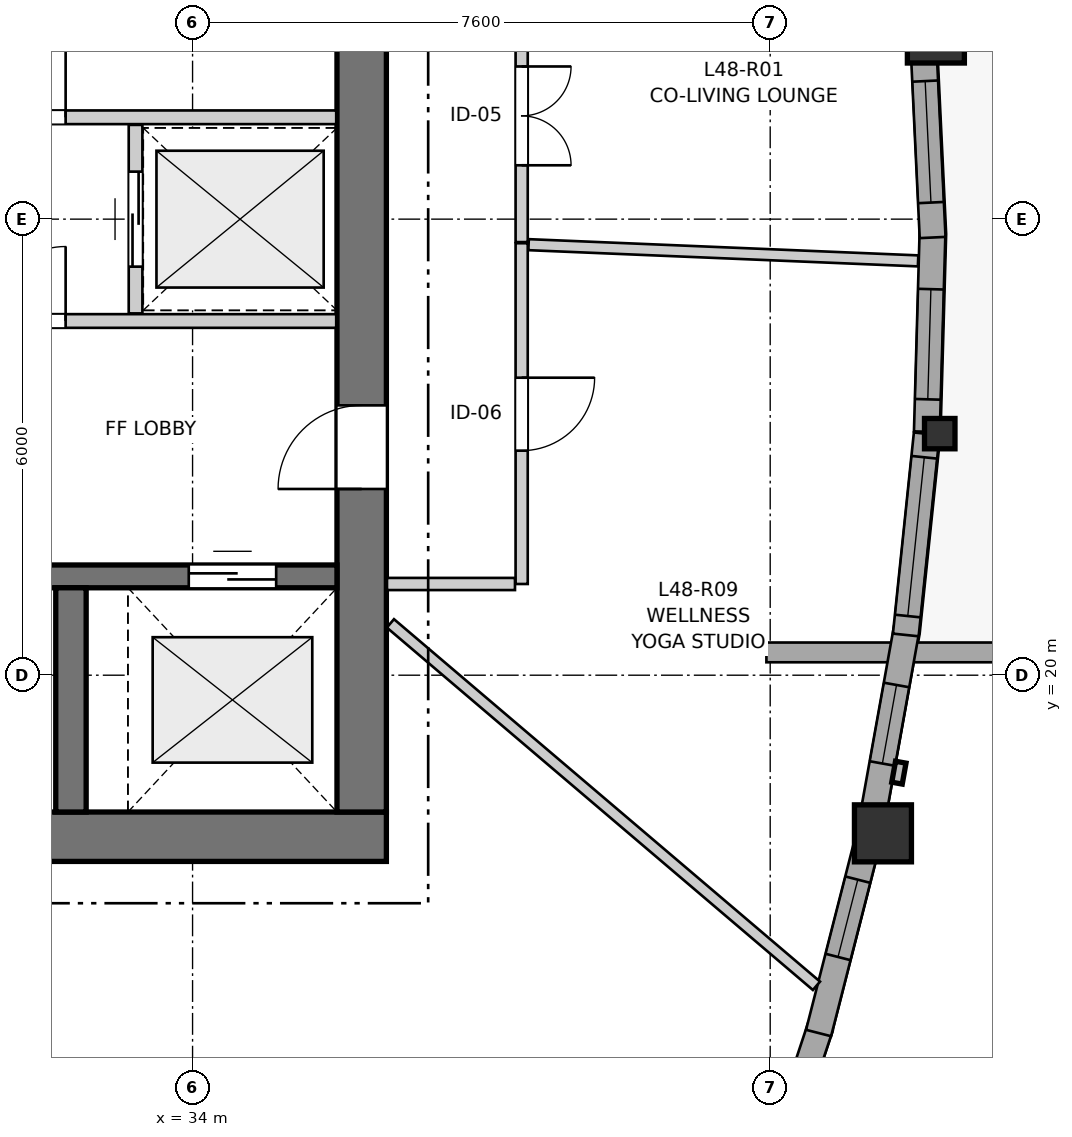
"""IFC4 building model, lengths in metres.
Left out: names, types, materials, properties, quantities, classifications, styles, units other than length and angle.
Written with IfcOpenShell. Run it as: python <this file> out.ifc"""

import sys

from ifc_helpers import new_model, si_unit, direction, frame, frame_2d, origin, origin_2d, place, context, subcontext, project, spatial, rectangle, i_section, extrude, source, transform, mapped, element, fill, save


model = new_model("IFC4")
c1 = context("Model", 3, precision=1e-05, world=origin(), true_north=direction((0.0, 1.0)))
c2 = subcontext(c1, "Body", "Model", "MODEL_VIEW")
j1 = project(units=[si_unit("LENGTHUNIT", "METRE"), si_unit("PLANEANGLEUNIT", "RADIAN")], contexts=[c1])
p1 = place(None, origin())
s1 = spatial("IfcSite", under=j1, at=p1, CompositionType="ELEMENT")
p2 = place(p1, origin())
s2 = spatial("IfcBuilding", under=s1, at=p2, CompositionType="ELEMENT")
p3 = place(p2, frame((0.0, 0.0, 161.8)))
s3 = spatial("IfcBuildingStorey", under=s2, at=p3, CompositionType="ELEMENT", Elevation=161.8)
p4 = place(p3, frame((24.15, 17.875, 0.0), z_axis=(0.0, 0.0, 1.0), x_axis=(1.0, 0.0, 0.0)))
e1 = element("IfcWall", 1, at=p4, inside=s3, PredefinedType="SHEAR", context=c2, shape_type="SweptSolid", body=[
    extrude(rectangle(XDim=12.4, YDim=0.65, at=frame_2d((6.2, 0.0))), origin(), (0.0, 0.0, 1.0), 2.95),
])
p5 = place(p3, frame((36.225, 18.2, 0.0), z_axis=(0.0, 0.0, 1.0), x_axis=(0.0, 1.0, 0.0)))
e2 = element("IfcWall", 2, at=p5, inside=s3, PredefinedType="SHEAR", context=c2, shape_type="SweptSolid", body=[
    extrude(rectangle(XDim=15.6, YDim=0.65, at=frame_2d((7.8, 0.0))), origin(), (0.0, 0.0, 1.0), 2.95),
])
p6 = place(p5, frame((4.25, 0.0, 0.0)))
e3 = element("IfcOpeningElement", 3, at=p6, cuts=e2, PredefinedType="OPENING", context=c2, shape_type="SweptSolid", body=[
    extrude(rectangle(XDim=1.1, YDim=2.15, at=frame_2d((0.55, 1.075))), frame((0.0, 0.335, 0.0), z_axis=(0.0, -1.0, 0.0), x_axis=(1.0, 0.0, 0.0)), (0.0, 0.0, 1.0), 0.67),
])
p7 = place(p5, frame((10.25, 0.0, 0.0)))
e4 = element("IfcOpeningElement", 4, at=p7, cuts=e2, PredefinedType="OPENING", context=c2, shape_type="SweptSolid", body=[
    extrude(rectangle(XDim=1.1, YDim=2.15, at=frame_2d((0.55, 1.075))), frame((0.0, 0.335, 0.0), z_axis=(0.0, -1.0, 0.0), x_axis=(1.0, 0.0, 0.0)), (0.0, 0.0, 1.0), 0.67),
])
p8 = place(p3, frame((24.8, 21.3, 0.0), z_axis=(0.0, 0.0, 1.0), x_axis=(1.0, 0.0, 0.0)))
e5 = element("IfcWall", 5, at=p8, inside=s3, PredefinedType="SHEAR", context=c2, shape_type="SweptSolid", body=[
    extrude(rectangle(XDim=11.1, YDim=0.3, at=frame_2d((5.55, 0.0))), origin(), (0.0, 0.0, 1.0), 2.95),
])
p9 = place(p8, frame((6.22, 0.0, 0.0)))
e6 = element("IfcOpeningElement", 6, at=p9, cuts=e5, PredefinedType="OPENING", context=c2, shape_type="SweptSolid", body=[
    extrude(rectangle(XDim=0.98, YDim=2.15, at=frame_2d((0.49, 1.075))), frame((0.0, 0.16, 0.0), z_axis=(0.0, -1.0, 0.0), x_axis=(1.0, 0.0, 0.0)), (0.0, 0.0, 1.0), 0.32),
])
p10 = place(p8, frame((9.15, 0.0, 0.0)))
e7 = element("IfcOpeningElement", 7, at=p10, cuts=e5, PredefinedType="OPENING", context=c2, shape_type="SweptSolid", body=[
    extrude(rectangle(XDim=1.15, YDim=2.15, at=frame_2d((0.575, 1.075))), frame((0.0, 0.16, 0.0), z_axis=(0.0, -1.0, 0.0), x_axis=(1.0, 0.0, 0.0)), (0.0, 0.0, 1.0), 0.32),
])
p11 = place(p3, frame((32.4, 18.2, 0.0), z_axis=(0.0, 0.0, 1.0), x_axis=(0.0, 1.0, 0.0)))
e8 = element("IfcWall", 8, at=p11, inside=s3, PredefinedType="SHEAR", context=c2, shape_type="SweptSolid", body=[
    extrude(rectangle(XDim=2.95, YDim=0.4, at=frame_2d((1.475, 0.0))), origin(), (0.0, 0.0, 1.0), 2.95),
])
m1 = source(origin(), c2, "Body", "SweptSolid", [
    extrude(rectangle(XDim=0.75, YDim=0.75, at=origin_2d()), origin(), (0.0, 0.0, 1.0), 2.95),
])
p12 = place(p3, frame((43.083, 17.919, 0.0), z_axis=(0.0, 0.0, 1.0), x_axis=(1.0, 0.0, 0.0)))
e9 = element("IfcColumn", 9, at=p12, inside=s3, PredefinedType="COLUMN", context=c2, shape_type="MappedRepresentation", body=[
    mapped(m1, transform((0.0, 0.0, 0.0), x_axis=(1.0, 0.0, 0.0), y_axis=(0.0, 1.0, 0.0), z_axis=(0.0, 0.0, 1.0), scale=1.0)),
])
m2 = source(origin(), c2, "Body", "SweptSolid", [
    extrude(i_section(OverallWidth=0.401, OverallDepth=0.399, WebThickness=0.023, FlangeThickness=0.036, FilletRadius=0.015, at=origin_2d()), origin(), (0.0, 0.0, 1.0), 2.95),
])
p13 = place(p3, frame((43.831, 23.178, 0.0), z_axis=(0.0, 0.0, 1.0), x_axis=(1.0, 0.0, 0.0)))
e10 = element("IfcColumn", 10, at=p13, inside=s3, PredefinedType="PILASTER", context=c2, shape_type="MappedRepresentation", body=[
    mapped(m2, transform((0.0, 0.0, 0.0), x_axis=(1.0, 0.0, 0.0), y_axis=(0.0, 1.0, 0.0), z_axis=(0.0, 0.0, 1.0), scale=1.0)),
])
p14 = place(p3, frame((43.78, 28.429, 0.0), z_axis=(0.0, 0.0, 1.0), x_axis=(1.0, 0.0, 0.0)))
e11 = element("IfcColumn", 11, at=p14, inside=s3, PredefinedType="COLUMN", context=c2, shape_type="MappedRepresentation", body=[
    mapped(m1, transform((0.0, 0.0, 0.0), x_axis=(1.0, 0.0, 0.0), y_axis=(0.0, 1.0, 0.0), z_axis=(0.0, 0.0, 1.0), scale=1.0)),
])
p15 = place(p3, frame((41.55, 20.3, 0.0), z_axis=(0.0, 0.0, 1.0), x_axis=(1.0, 0.0, 0.0)))
e12 = element("IfcWall", 12, at=p15, inside=s3, PredefinedType="PARAPET", context=c2, shape_type="SweptSolid", body=[
    extrude(rectangle(XDim=17.843, YDim=0.26, at=frame_2d((8.921, 0.0))), origin(), (0.0, 0.0, 1.0), 0.55),
])
p16 = place(p3, frame((41.383, 12.726, 0.0), z_axis=(0.0, 0.0, 1.0), x_axis=(0.314443872574, 0.949276066801, 0.0)))
e13 = element("IfcWall", 13, at=p16, inside=s3, PredefinedType="SOLIDWALL", context=c2, shape_type="SweptSolid", body=[
    extrude(rectangle(XDim=2.793, YDim=0.34, at=frame_2d((1.396, 0.0))), origin(), (0.0, 0.0, 1.0), 2.53),
])
p17 = place(p16, frame((0.711, 0.0, 0.82)))
e14 = element("IfcOpeningElement", 14, at=p17, cuts=e13, PredefinedType="OPENING", context=c2, shape_type="SweptSolid", body=[
    extrude(rectangle(XDim=1.35, YDim=1.45, at=frame_2d((0.675, 0.725))), frame((0.0, 0.18, 0.0), z_axis=(0.0, -1.0, 0.0), x_axis=(1.0, 0.0, 0.0)), (0.0, 0.0, 1.0), 0.36),
])
p18 = place(p3, frame((42.236, 15.292, 0.0), z_axis=(0.0, 0.0, 1.0), x_axis=(0.24772461275, 0.968830488908, 0.0)))
e15 = element("IfcWall", 15, at=p18, inside=s3, PredefinedType="SOLIDWALL", context=c2, shape_type="SweptSolid", body=[
    extrude(rectangle(XDim=2.6, YDim=0.34, at=frame_2d((1.3, 0.0))), origin(), (0.0, 0.0, 1.0), 2.53),
])
p19 = place(p18, frame((1.033, 0.0, 0.82)))
e16 = element("IfcOpeningElement", 16, at=p19, cuts=e15, PredefinedType="OPENING", context=c2, shape_type="SweptSolid", body=[
    extrude(rectangle(XDim=1.05, YDim=1.45, at=frame_2d((0.525, 0.725))), frame((0.0, 0.18, 0.0), z_axis=(0.0, -1.0, 0.0), x_axis=(1.0, 0.0, 0.0)), (0.0, 0.0, 1.0), 0.36),
])
p20 = place(p3, frame((42.944, 18.102, 0.0), z_axis=(0.0, 0.0, 1.0), x_axis=(0.177119685378, 0.98418931972, 0.0)))
e17 = element("IfcWall", 17, at=p20, inside=s3, PredefinedType="SOLIDWALL", context=c2, shape_type="SweptSolid", body=[
    extrude(rectangle(XDim=2.555, YDim=0.34, at=frame_2d((1.278, 0.0))), origin(), (0.0, 0.0, 1.0), 2.53),
])
p21 = place(p20, frame((0.748, 0.0, 0.82)))
e18 = element("IfcOpeningElement", 18, at=p21, cuts=e17, PredefinedType="OPENING", context=c2, shape_type="SweptSolid", body=[
    extrude(rectangle(XDim=1.05, YDim=1.45, at=frame_2d((0.525, 0.725))), frame((0.0, 0.18, 0.0), z_axis=(0.0, -1.0, 0.0), x_axis=(1.0, 0.0, 0.0)), (0.0, 0.0, 1.0), 0.36),
])
p22 = place(p3, frame((43.384, 20.53, 0.0), z_axis=(0.0, 0.0, 1.0), x_axis=(0.103600410634, 0.994618999877, 0.0)))
e19 = element("IfcWall", 19, at=p22, inside=s3, PredefinedType="SOLIDWALL", context=c2, shape_type="SweptSolid", body=[
    extrude(rectangle(XDim=2.661, YDim=0.34, at=frame_2d((1.33, 0.0))), origin(), (0.0, 0.0, 1.0), 2.53),
])
p23 = place(p22, frame((0.25, 0.0, 0.82)))
e20 = element("IfcOpeningElement", 20, at=p23, cuts=e19, PredefinedType="OPENING", context=c2, shape_type="SweptSolid", body=[
    extrude(rectangle(XDim=2.1, YDim=1.4, at=frame_2d((1.05, 0.7))), frame((0.0, 0.18, 0.0), z_axis=(0.0, -1.0, 0.0), x_axis=(1.0, 0.0, 0.0)), (0.0, 0.0, 1.0), 0.36),
])
p24 = place(p3, frame((43.661, 23.203, 0.0), z_axis=(0.0, 0.0, 1.0), x_axis=(0.028240970376, 0.999601144253, 0.0)))
e21 = element("IfcWall", 21, at=p24, inside=s3, PredefinedType="SOLIDWALL", context=c2, shape_type="SweptSolid", body=[
    extrude(rectangle(XDim=2.645, YDim=0.34, at=frame_2d((1.323, 0.0))), origin(), (0.0, 0.0, 1.0), 2.53),
])
p25 = place(p24, frame((0.427, 0.0, 0.82)))
e22 = element("IfcOpeningElement", 22, at=p25, cuts=e21, PredefinedType="OPENING", context=c2, shape_type="SweptSolid", body=[
    extrude(rectangle(XDim=1.45, YDim=1.25, at=frame_2d((0.725, 0.625))), frame((0.0, 0.18, 0.0), z_axis=(0.0, -1.0, 0.0), x_axis=(1.0, 0.0, 0.0)), (0.0, 0.0, 1.0), 0.36),
])
p26 = place(p3, frame((43.737, 25.758, 0.0), z_axis=(0.0, 0.0, 1.0), x_axis=(-0.047648310491, 0.998864174204, 0.0)))
e23 = element("IfcWall", 23, at=p26, inside=s3, PredefinedType="SOLIDWALL", context=c2, shape_type="SweptSolid", body=[
    extrude(rectangle(XDim=2.511, YDim=0.34, at=frame_2d((1.255, 0.0))), origin(), (0.0, 0.0, 1.0), 2.53),
])
p27 = place(p26, frame((0.46, 0.0, 0.82)))
e24 = element("IfcOpeningElement", 24, at=p27, cuts=e23, PredefinedType="OPENING", context=c2, shape_type="SweptSolid", body=[
    extrude(rectangle(XDim=1.6, YDim=1.35, at=frame_2d((0.8, 0.675))), frame((0.0, 0.18, 0.0), z_axis=(0.0, -1.0, 0.0), x_axis=(1.0, 0.0, 0.0)), (0.0, 0.0, 1.0), 0.36),
])
p28 = place(p3, frame((30.67, 24.66, 0.0), z_axis=(0.0, 0.0, 1.0), x_axis=(1.0, 0.0, 0.0)))
e25 = element("IfcWall", 25, at=p28, inside=s3, PredefinedType="PARTITIONING", context=c2, shape_type="SweptSolid", body=[
    extrude(rectangle(XDim=5.22, YDim=0.18, at=frame_2d((2.61, 0.0))), origin(), (0.0, 0.0, 1.0), 2.95),
])
p29 = place(p28, frame((0.68, 0.0, 0.0)))
e26 = element("IfcOpeningElement", 26, at=p29, cuts=e25, PredefinedType="OPENING", context=c2, shape_type="SweptSolid", body=[
    extrude(rectangle(XDim=0.98, YDim=2.15, at=frame_2d((0.49, 1.075))), frame((0.0, 0.1, 0.0), z_axis=(0.0, -1.0, 0.0), x_axis=(1.0, 0.0, 0.0)), (0.0, 0.0, 1.0), 0.2),
])
p30 = place(p3, frame((30.67, 27.34, 0.0), z_axis=(0.0, 0.0, 1.0), x_axis=(1.0, 0.0, 0.0)))
e27 = element("IfcWall", 27, at=p30, inside=s3, PredefinedType="PARTITIONING", context=c2, shape_type="SweptSolid", body=[
    extrude(rectangle(XDim=5.22, YDim=0.18, at=frame_2d((2.61, 0.0))), origin(), (0.0, 0.0, 1.0), 2.95),
])
p31 = place(p30, frame((0.68, 0.0, 0.0)))
e28 = element("IfcOpeningElement", 28, at=p31, cuts=e27, PredefinedType="OPENING", context=c2, shape_type="SweptSolid", body=[
    extrude(rectangle(XDim=0.98, YDim=2.15, at=frame_2d((0.49, 1.075))), frame((0.0, 0.1, 0.0), z_axis=(0.0, -1.0, 0.0), x_axis=(1.0, 0.0, 0.0)), (0.0, 0.0, 1.0), 0.2),
])
p32 = place(p3, frame((33.25, 24.76, 0.0), z_axis=(0.0, 0.0, 1.0), x_axis=(0.0, 1.0, 0.0)))
e29 = element("IfcWall", 29, at=p32, inside=s3, PredefinedType="PARTITIONING", context=c2, shape_type="SweptSolid", body=[
    extrude(rectangle(XDim=2.48, YDim=0.18, at=frame_2d((1.24, 0.0))), origin(), (0.0, 0.0, 1.0), 2.95),
])
p33 = place(p32, frame((0.615, 0.0, 0.0)))
e30 = element("IfcOpeningElement", 30, at=p33, cuts=e29, PredefinedType="OPENING", context=c2, shape_type="SweptSolid", body=[
    extrude(rectangle(XDim=1.25, YDim=2.15, at=frame_2d((0.625, 1.075))), frame((0.0, 0.1, 0.0), z_axis=(0.0, -1.0, 0.0), x_axis=(1.0, 0.0, 0.0)), (0.0, 0.0, 1.0), 0.2),
])
p34 = place(p3, frame((38.33, 25.683, 0.0), z_axis=(0.0, 0.0, 1.0), x_axis=(0.0, -1.0, 0.0)))
e31 = element("IfcWall", 31, at=p34, inside=s3, PredefinedType="PARTITIONING", context=c2, shape_type="SweptSolid", body=[
    extrude(rectangle(XDim=4.483, YDim=0.16, at=frame_2d((2.242, 0.0))), origin(), (0.0, 0.0, 1.0), 2.95),
])
p35 = place(p34, frame((1.769, 0.0, 0.0)))
e32 = element("IfcOpeningElement", 32, at=p35, cuts=e31, PredefinedType="OPENING", context=c2, shape_type="SweptSolid", body=[
    extrude(rectangle(XDim=0.96, YDim=2.1, at=frame_2d((0.48, 1.05))), frame((0.0, 0.09, 0.0), z_axis=(0.0, -1.0, 0.0), x_axis=(1.0, 0.0, 0.0)), (0.0, 0.0, 1.0), 0.18),
])
p36 = place(p3, frame((38.33, 29.019, 0.0), z_axis=(0.0, 0.0, 1.0), x_axis=(0.0, -1.0, 0.0)))
e33 = element("IfcWall", 33, at=p36, inside=s3, PredefinedType="PARTITIONING", context=c2, shape_type="SweptSolid", body=[
    extrude(rectangle(XDim=3.321, YDim=0.16, at=frame_2d((1.661, 0.0))), origin(), (0.0, 0.0, 1.0), 2.95),
])
p37 = place(p36, frame((1.01, 0.0, 0.0)))
e34 = element("IfcOpeningElement", 34, at=p37, cuts=e33, PredefinedType="OPENING", context=c2, shape_type="SweptSolid", body=[
    extrude(rectangle(XDim=1.3, YDim=2.1, at=frame_2d((0.65, 1.05))), frame((0.0, 0.09, 0.0), z_axis=(0.0, -1.0, 0.0), x_axis=(1.0, 0.0, 0.0)), (0.0, 0.0, 1.0), 0.18),
])
p38 = place(p3, frame((36.603, 20.682, 0.0), z_axis=(0.0, 0.0, 1.0), x_axis=(0.761710074833, -0.647918020971, 0.0)))
e35 = element("IfcWall", 35, at=p38, inside=s3, PredefinedType="PARTITIONING", context=c2, shape_type="SweptSolid", body=[
    extrude(rectangle(XDim=7.359, YDim=0.145, at=frame_2d((3.68, 0.0))), origin(), (0.0, 0.0, 1.0), 2.95),
])
p39 = place(p3, frame((38.421, 25.664, 0.0), z_axis=(0.0, 0.0, 1.0), x_axis=(0.999132413059, -0.041646382499, 0.0)))
e36 = element("IfcWall", 36, at=p39, inside=s3, PredefinedType="PARTITIONING", context=c2, shape_type="SweptSolid", body=[
    extrude(rectangle(XDim=5.129, YDim=0.145, at=frame_2d((2.565, 0.0))), origin(), (0.0, 0.0, 1.0), 2.95),
])
p40 = place(p3, frame((36.558, 21.2, 0.0), z_axis=(0.0, 0.0, 1.0), x_axis=(1.0, 0.0, 0.0)))
e37 = element("IfcWall", 37, at=p40, inside=s3, PredefinedType="PARTITIONING", context=c2, shape_type="SweptSolid", body=[
    extrude(rectangle(XDim=1.684, YDim=0.16, at=frame_2d((0.842, 0.0))), origin(), (0.0, 0.0, 1.0), 2.95),
])
m3 = source(origin(), c2, "Body", "SweptSolid", [
    extrude(rectangle(XDim=1.05, YDim=1.45, at=frame_2d((0.525, 0.725))), frame((0.0, 0.03, 0.0), z_axis=(0.0, -1.0, 0.0), x_axis=(1.0, 0.0, 0.0)), (0.0, 0.0, 1.0), 0.06),
])
p41 = place(p19, origin())
e38 = element("IfcWindow", 38, at=p41, inside=s3, PartitioningType="SINGLE_PANEL", PredefinedType="WINDOW", context=c2, shape_type="MappedRepresentation", body=[
    mapped(m3, transform((0.0, 0.0, 0.0), x_axis=(1.0, 0.0, 0.0), y_axis=(0.0, 1.0, 0.0), z_axis=(0.0, 0.0, 1.0), scale=1.0)),
])
fill(e16, e38)
p42 = place(p21, origin())
e39 = element("IfcWindow", 39, at=p42, inside=s3, PartitioningType="SINGLE_PANEL", PredefinedType="WINDOW", context=c2, shape_type="MappedRepresentation", body=[
    mapped(m3, transform((0.0, 0.0, 0.0), x_axis=(1.0, 0.0, 0.0), y_axis=(0.0, 1.0, 0.0), z_axis=(0.0, 0.0, 1.0), scale=1.0)),
])
fill(e18, e39)
m4 = source(origin(), c2, "Body", "SweptSolid", [
    extrude(rectangle(XDim=2.1, YDim=1.4, at=frame_2d((1.05, 0.7))), frame((0.0, 0.03, 0.0), z_axis=(0.0, -1.0, 0.0), x_axis=(1.0, 0.0, 0.0)), (0.0, 0.0, 1.0), 0.06),
])
p43 = place(p23, origin())
e40 = element("IfcWindow", 40, at=p43, inside=s3, PartitioningType="SINGLE_PANEL", PredefinedType="WINDOW", context=c2, shape_type="MappedRepresentation", body=[
    mapped(m4, transform((0.0, 0.0, 0.0), x_axis=(1.0, 0.0, 0.0), y_axis=(0.0, 1.0, 0.0), z_axis=(0.0, 0.0, 1.0), scale=1.0)),
])
fill(e20, e40)
m5 = source(origin(), c2, "Body", "SweptSolid", [
    extrude(rectangle(XDim=1.45, YDim=1.25, at=frame_2d((0.725, 0.625))), frame((0.0, 0.03, 0.0), z_axis=(0.0, -1.0, 0.0), x_axis=(1.0, 0.0, 0.0)), (0.0, 0.0, 1.0), 0.06),
])
p44 = place(p25, origin())
e41 = element("IfcWindow", 41, at=p44, inside=s3, PartitioningType="SINGLE_PANEL", PredefinedType="WINDOW", context=c2, shape_type="MappedRepresentation", body=[
    mapped(m5, transform((0.0, 0.0, 0.0), x_axis=(1.0, 0.0, 0.0), y_axis=(0.0, 1.0, 0.0), z_axis=(0.0, 0.0, 1.0), scale=1.0)),
])
fill(e22, e41)
m6 = source(origin(), c2, "Body", "SweptSolid", [
    extrude(rectangle(XDim=1.6, YDim=1.35, at=frame_2d((0.8, 0.675))), frame((0.0, 0.03, 0.0), z_axis=(0.0, -1.0, 0.0), x_axis=(1.0, 0.0, 0.0)), (0.0, 0.0, 1.0), 0.06),
])
p45 = place(p27, origin())
e42 = element("IfcWindow", 42, at=p45, inside=s3, PartitioningType="SINGLE_PANEL", PredefinedType="WINDOW", context=c2, shape_type="MappedRepresentation", body=[
    mapped(m6, transform((0.0, 0.0, 0.0), x_axis=(1.0, 0.0, 0.0), y_axis=(0.0, 1.0, 0.0), z_axis=(0.0, 0.0, 1.0), scale=1.0)),
])
fill(e24, e42)
m7 = source(origin(), c2, "Body", "SweptSolid", [
    extrude(rectangle(XDim=1.15, YDim=2.15, at=frame_2d((0.575, 1.075))), frame((0.0, 0.025, 0.0), z_axis=(0.0, -1.0, 0.0), x_axis=(1.0, 0.0, 0.0)), (0.0, 0.0, 1.0), 0.05),
])
p46 = place(p10, origin())
e43 = element("IfcDoor", 43, at=p46, inside=s3, OperationType="DOUBLE_DOOR_SLIDING", PredefinedType="DOOR", context=c2, shape_type="MappedRepresentation", body=[
    mapped(m7, transform((0.0, 0.0, 0.0), x_axis=(1.0, 0.0, 0.0), y_axis=(0.0, 1.0, 0.0), z_axis=(0.0, 0.0, 1.0), scale=1.0)),
])
fill(e7, e43)
m8 = source(origin(), c2, "Body", "SweptSolid", [
    extrude(rectangle(XDim=1.1, YDim=2.15, at=frame_2d((0.55, 1.075))), frame((0.0, 0.025, 0.0), z_axis=(0.0, -1.0, 0.0), x_axis=(1.0, 0.0, 0.0)), (0.0, 0.0, 1.0), 0.05),
])
p47 = place(p6, origin())
e44 = element("IfcDoor", 44, at=p47, inside=s3, OperationType="SINGLE_SWING_LEFT", PredefinedType="DOOR", context=c2, shape_type="MappedRepresentation", body=[
    mapped(m8, transform((0.0, 0.0, 0.0), x_axis=(1.0, 0.0, 0.0), y_axis=(0.0, 1.0, 0.0), z_axis=(0.0, 0.0, 1.0), scale=1.0)),
])
fill(e3, e44)
m9 = source(origin(), c2, "Body", "SweptSolid", [
    extrude(rectangle(XDim=0.98, YDim=2.15, at=frame_2d((0.49, 1.075))), frame((0.0, 0.025, 0.0), z_axis=(0.0, -1.0, 0.0), x_axis=(1.0, 0.0, 0.0)), (0.0, 0.0, 1.0), 0.05),
])
p48 = place(p29, origin())
e45 = element("IfcDoor", 45, at=p48, inside=s3, OperationType="SINGLE_SWING_RIGHT", PredefinedType="DOOR", context=c2, shape_type="MappedRepresentation", body=[
    mapped(m9, transform((0.0, 0.0, 0.0), x_axis=(1.0, 0.0, 0.0), y_axis=(0.0, 1.0, 0.0), z_axis=(0.0, 0.0, 1.0), scale=1.0)),
])
fill(e26, e45)
p49 = place(p31, origin())
e46 = element("IfcDoor", 46, at=p49, inside=s3, OperationType="SINGLE_SWING_RIGHT", PredefinedType="DOOR", context=c2, shape_type="MappedRepresentation", body=[
    mapped(m9, transform((0.0, 0.0, 0.0), x_axis=(1.0, 0.0, 0.0), y_axis=(0.0, 1.0, 0.0), z_axis=(0.0, 0.0, 1.0), scale=1.0)),
])
fill(e28, e46)
m10 = source(origin(), c2, "Body", "SweptSolid", [
    extrude(rectangle(XDim=1.25, YDim=2.15, at=frame_2d((0.625, 1.075))), frame((0.0, 0.025, 0.0), z_axis=(0.0, -1.0, 0.0), x_axis=(1.0, 0.0, 0.0)), (0.0, 0.0, 1.0), 0.05),
])
p50 = place(p33, origin())
e47 = element("IfcDoor", 47, at=p50, inside=s3, OperationType="DOUBLE_DOOR_SLIDING", PredefinedType="DOOR", context=c2, shape_type="MappedRepresentation", body=[
    mapped(m10, transform((0.0, 0.0, 0.0), x_axis=(1.0, 0.0, 0.0), y_axis=(0.0, 1.0, 0.0), z_axis=(0.0, 0.0, 1.0), scale=1.0)),
])
fill(e30, e47)
m11 = source(origin(), c2, "Body", "SweptSolid", [
    extrude(rectangle(XDim=0.96, YDim=2.1, at=frame_2d((0.48, 1.05))), frame((0.0, 0.025, 0.0), z_axis=(0.0, -1.0, 0.0), x_axis=(1.0, 0.0, 0.0)), (0.0, 0.0, 1.0), 0.05),
])
p51 = place(p35, origin())
e48 = element("IfcDoor", 48, at=p51, inside=s3, OperationType="SINGLE_SWING_LEFT", PredefinedType="DOOR", context=c2, shape_type="MappedRepresentation", body=[
    mapped(m11, transform((0.0, 0.0, 0.0), x_axis=(1.0, 0.0, 0.0), y_axis=(0.0, 1.0, 0.0), z_axis=(0.0, 0.0, 1.0), scale=1.0)),
])
fill(e32, e48)
m12 = source(origin(), c2, "Body", "SweptSolid", [
    extrude(rectangle(XDim=1.3, YDim=2.1, at=frame_2d((0.65, 1.05))), frame((0.0, 0.025, 0.0), z_axis=(0.0, -1.0, 0.0), x_axis=(1.0, 0.0, 0.0)), (0.0, 0.0, 1.0), 0.05),
])
p52 = place(p37, origin())
e49 = element("IfcDoor", 49, at=p52, inside=s3, OperationType="DOUBLE_DOOR_SINGLE_SWING", PredefinedType="DOOR", context=c2, shape_type="MappedRepresentation", body=[
    mapped(m12, transform((0.0, 0.0, 0.0), x_axis=(1.0, 0.0, 0.0), y_axis=(0.0, 1.0, 0.0), z_axis=(0.0, 0.0, 1.0), scale=1.0)),
])
fill(e34, e49)
save(model, sys.argv[1])
